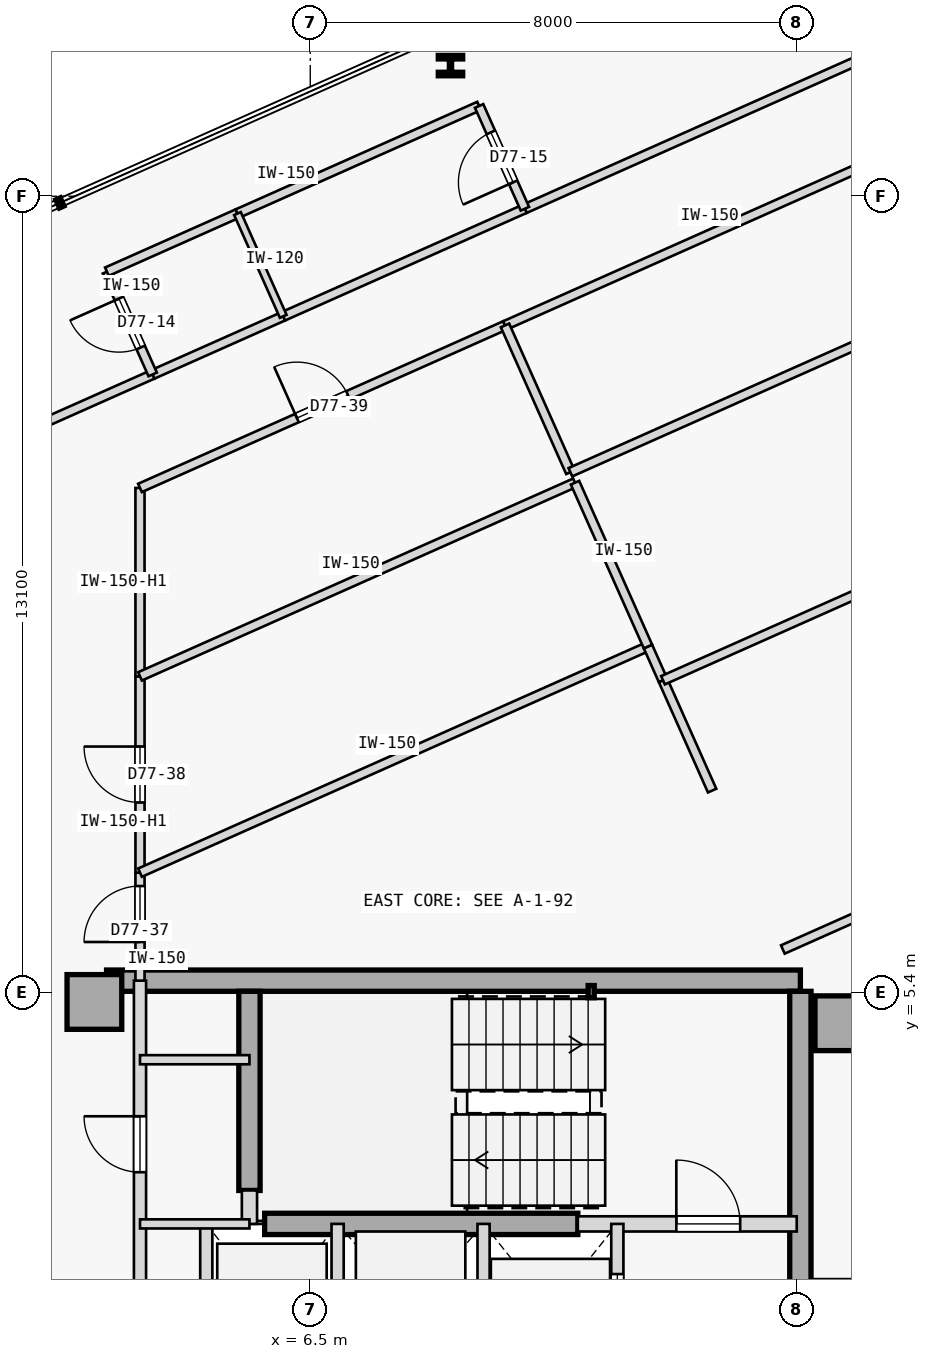
"""IFC4 building model, lengths in metres.
Left out: names, types, materials, properties, quantities, classifications, styles, units other than length and angle.
Written with IfcOpenShell. Run it as: python <this file> out.ifc"""

import sys

from ifc_helpers import new_model, si_unit, direction, frame, frame_2d, origin, origin_2d, place, context, subcontext, project, spatial, rectangle, hollow_rectangle, i_section, extrude, element, fill, save


model = new_model("IFC4")
c1 = context("Model", 3, precision=1e-05, world=origin(), true_north=direction((0.0, 1.0)))
c2 = subcontext(c1, "Body", "Model", "MODEL_VIEW")
j1 = project(units=[si_unit("LENGTHUNIT", "METRE"), si_unit("PLANEANGLEUNIT", "RADIAN")], contexts=[c1])
p1 = place(None, origin())
s1 = spatial("IfcSite", under=j1, at=p1, CompositionType="ELEMENT")
p2 = place(p1, origin())
s2 = spatial("IfcBuilding", under=s1, at=p2, CompositionType="ELEMENT")
p3 = place(p2, frame((0.0, 0.0, 288.6)))
s3 = spatial("IfcBuildingStorey", under=s2, at=p3, CompositionType="ELEMENT", Elevation=288.6)
for number, where, z_axis, x_axis in (
    (1, (15.25, 4.9, 0.0), (0.0, 0.0, 1.0), (1.0, 0.0, 0.0)),
    (2, (2.95, 5.25, 0.0), (0.0, 0.0, 1.0), (1.0, 0.0, 0.0)),
):
    element("IfcColumn", number, at=place(p3, frame(where, z_axis=z_axis, x_axis=x_axis)), inside=s3, PredefinedType="COLUMN", context=c2, shape_type="SweptSolid", body=[
        extrude(rectangle(XDim=0.9, YDim=0.9, at=origin_2d()), origin(), (0.0, 0.0, 1.0), 3.35),
    ])
p4 = place(p3, frame((3.15, 5.6, 0.0), z_axis=(0.0, 0.0, 1.0), x_axis=(1.0, 0.0, 0.0)))
e3 = element("IfcWall", 3, at=p4, inside=s3, PredefinedType="SHEAR", context=c2, shape_type="SweptSolid", body=[
    extrude(rectangle(XDim=11.41, YDim=0.35, at=frame_2d((5.705, 0.0))), origin(), (0.0, 0.0, 1.0), 3.125),
])
p5 = place(p3, frame((14.56, -5.425, 0.0), z_axis=(0.0, 0.0, 1.0), x_axis=(0.0, 1.0, 0.0)))
e4 = element("IfcWall", 4, at=p5, inside=s3, PredefinedType="SHEAR", context=c2, shape_type="SweptSolid", body=[
    extrude(rectangle(XDim=10.85, YDim=0.35, at=frame_2d((5.425, 0.0))), origin(), (0.0, 0.0, 1.0), 3.125),
])
p6 = place(p3, frame((5.5, 2.15, 0.0), z_axis=(0.0, 0.0, 1.0), x_axis=(0.0, 1.0, 0.0)))
e5 = element("IfcWall", 5, at=p6, inside=s3, PredefinedType="SHEAR", context=c2, shape_type="SweptSolid", body=[
    extrude(rectangle(XDim=3.275, YDim=0.35, at=frame_2d((1.638, 0.0))), origin(), (0.0, 0.0, 1.0), 3.125),
])
p7 = place(p3, frame((5.75, 1.6, 0.0), z_axis=(0.0, 0.0, 1.0), x_axis=(1.0, 0.0, 0.0)))
e6 = element("IfcWall", 6, at=p7, inside=s3, PredefinedType="SHEAR", context=c2, shape_type="SweptSolid", body=[
    extrude(rectangle(XDim=5.15, YDim=0.35, at=frame_2d((2.575, 0.0))), origin(), (0.0, 0.0, 1.0), 3.125),
])
p8 = place(p3, frame((11.12, 5.42, 0.0), z_axis=(0.0, 0.0, 1.0), x_axis=(1.0, 0.0, 0.0)))
e7 = element("IfcColumn", 7, at=p8, inside=s3, PredefinedType="COLUMN", context=c2, shape_type="SweptSolid", body=[
    extrude(hollow_rectangle(XDim=0.1, YDim=0.2, WallThickness=0.008, at=origin_2d()), origin(), (0.0, 0.0, 1.0), 3.35),
])
p9 = place(p3, frame((8.806, 20.648, 0.0), z_axis=(0.0, 0.0, 1.0), x_axis=(1.0, 0.0, 0.0)))
e8 = element("IfcColumn", 8, at=p9, inside=s3, PredefinedType="COLUMN", context=c2, shape_type="SweptSolid", body=[
    extrude(i_section(OverallWidth=0.401, OverallDepth=0.335, WebThickness=0.036, FlangeThickness=0.058, FilletRadius=0.015, at=origin_2d()), origin(), (0.0, 0.0, 1.0), 3.35),
])
p10 = place(p3, frame((10.9, 1.6, 0.0), z_axis=(0.0, 0.0, 1.0), x_axis=(1.0, 0.0, 0.0)))
e9 = element("IfcWall", 9, at=p10, inside=s3, PredefinedType="STANDARD", context=c2, shape_type="SweptSolid", body=[
    extrude(rectangle(XDim=3.6, YDim=0.25, at=frame_2d((1.8, 0.0))), origin(), (0.0, 0.0, 1.0), 3.125),
])
p11 = place(p10, frame((1.62, 0.0, 0.0)))
e10 = element("IfcOpeningElement", 10, at=p11, cuts=e9, PredefinedType="OPENING", context=c2, shape_type="SweptSolid", body=[
    extrude(rectangle(XDim=1.05, YDim=2.15, at=frame_2d((0.525, 1.075))), frame((0.0, 0.135, 0.0), z_axis=(0.0, -1.0, 0.0), x_axis=(1.0, 0.0, 0.0)), (0.0, 0.0, 1.0), 0.27),
])
p12 = place(p3, frame((5.5, 1.6, 0.0), z_axis=(0.0, 0.0, 1.0), x_axis=(0.0, 1.0, 0.0)))
e11 = element("IfcWall", 11, at=p12, inside=s3, PredefinedType="STANDARD", context=c2, shape_type="SweptSolid", body=[
    extrude(rectangle(XDim=0.55, YDim=0.25, at=frame_2d((0.275, 0.0))), origin(), (0.0, 0.0, 1.0), 3.125),
])
p13 = place(p3, frame((3.7, -1.15, 0.0), z_axis=(0.0, 0.0, 1.0), x_axis=(0.0, 1.0, 0.0)))
e12 = element("IfcWall", 12, at=p13, inside=s3, PredefinedType="STANDARD", context=c2, shape_type="SweptSolid", body=[
    extrude(rectangle(XDim=6.75, YDim=0.2, at=frame_2d((3.375, 0.0))), origin(), (0.0, 0.0, 1.0), 3.125),
])
p14 = place(p13, frame((3.6, 0.0, 0.0)))
e13 = element("IfcOpeningElement", 13, at=p14, cuts=e12, PredefinedType="OPENING", context=c2, shape_type="SweptSolid", body=[
    extrude(rectangle(XDim=0.92, YDim=2.15, at=frame_2d((0.46, 1.075))), frame((0.0, 0.11, 0.0), z_axis=(0.0, -1.0, 0.0), x_axis=(1.0, 0.0, 0.0)), (0.0, 0.0, 1.0), 0.22),
])
p15 = place(p13, frame((0.85, 0.0, 0.0)))
e14 = element("IfcOpeningElement", 14, at=p15, cuts=e12, PredefinedType="OPENING", context=c2, shape_type="SweptSolid", body=[
    extrude(rectangle(XDim=0.9, YDim=2.15, at=frame_2d((0.45, 1.075))), frame((0.0, 0.11, 0.0), z_axis=(0.0, -1.0, 0.0), x_axis=(1.0, 0.0, 0.0)), (0.0, 0.0, 1.0), 0.22),
])
p16 = place(p3, frame((11.55, -1.15, 0.0), z_axis=(0.0, 0.0, 1.0), x_axis=(0.0, 1.0, 0.0)))
e15 = element("IfcWall", 15, at=p16, inside=s3, PredefinedType="STANDARD", context=c2, shape_type="SweptSolid", body=[
    extrude(rectangle(XDim=2.75, YDim=0.2, at=frame_2d((1.375, 0.0))), origin(), (0.0, 0.0, 1.0), 3.125),
])
p17 = place(p16, frame((0.825, 0.0, 0.0)))
e16 = element("IfcOpeningElement", 16, at=p17, cuts=e15, PredefinedType="OPENING", context=c2, shape_type="SweptSolid", body=[
    extrude(rectangle(XDim=1.1, YDim=2.15, at=frame_2d((0.55, 1.075))), frame((0.0, 0.11, 0.0), z_axis=(0.0, -1.0, 0.0), x_axis=(1.0, 0.0, 0.0)), (0.0, 0.0, 1.0), 0.22),
])
for number, where, z_axis, x_axis in (
    (17, (9.35, -1.15, 0.0), (0.0, 0.0, 1.0), (0.0, 1.0, 0.0)),
    (18, (6.95, -1.15, 0.0), (0.0, 0.0, 1.0), (0.0, 1.0, 0.0)),
    (19, (4.79, -1.15, 0.0), (0.0, 0.0, 1.0), (0.0, 1.0, 0.0)),
):
    element("IfcWall", number, at=place(p3, frame(where, z_axis=z_axis, x_axis=x_axis)), inside=s3, PredefinedType="STANDARD", context=c2, shape_type="SweptSolid", body=[
        extrude(rectangle(XDim=2.75, YDim=0.2, at=frame_2d((1.375, 0.0))), origin(), (0.0, 0.0, 1.0), 3.125),
    ])
for number, where, z_axis, x_axis in (
    (20, (3.7, 4.3, 0.0), (0.0, 0.0, 1.0), (1.0, 0.0, 0.0)),
    (21, (3.7, 1.6, 0.0), (0.0, 0.0, 1.0), (1.0, 0.0, 0.0)),
):
    element("IfcWall", number, at=place(p3, frame(where, z_axis=z_axis, x_axis=x_axis)), inside=s3, PredefinedType="PARTITIONING", context=c2, shape_type="SweptSolid", body=[
        extrude(rectangle(XDim=1.8, YDim=0.15, at=frame_2d((0.9, 0.0))), origin(), (0.0, 0.0, 1.0), 3.125),
    ])
p18 = place(p3, frame((-1.166, 13.31, 0.0), z_axis=(0.0, 0.0, 1.0), x_axis=(0.913554005831, 0.406717442988, 0.0)))
e22 = element("IfcWall", 22, at=p18, inside=s3, PredefinedType="PARTITIONING", context=c2, shape_type="SweptSolid", body=[
    extrude(rectangle(XDim=5.555, YDim=0.15, at=frame_2d((2.777, 0.0))), origin(), (0.0, 0.0, 1.0), 3.125),
])
p19 = place(p3, frame((10.03, 18.294, 0.0), z_axis=(0.0, 0.0, 1.0), x_axis=(0.913545706015, 0.406736085222, 0.0)))
e23 = element("IfcWall", 23, at=p19, inside=s3, PredefinedType="PARTITIONING", context=c2, shape_type="SweptSolid", body=[
    extrude(rectangle(XDim=13.113, YDim=0.15, at=frame_2d((6.557, 0.0))), origin(), (0.0, 0.0, 1.0), 3.125),
])
p20 = place(p19, frame((6.082, 0.0, 0.0)))
e24 = element("IfcOpeningElement", 24, at=p20, cuts=e23, PredefinedType="OPENING", context=c2, shape_type="SweptSolid", body=[
    extrude(rectangle(XDim=0.95, YDim=2.15, at=frame_2d((0.475, 1.075))), frame((0.0, 0.085, 0.0), z_axis=(0.0, -1.0, 0.0), x_axis=(1.0, 0.0, 0.0)), (0.0, 0.0, 1.0), 0.17),
])
p21 = place(p3, frame((3.909, 15.569, 0.0), z_axis=(0.0, 0.0, 1.0), x_axis=(0.913541436194, 0.406745675276, 0.0)))
e25 = element("IfcWall", 25, at=p21, inside=s3, PredefinedType="PARTITIONING", context=c2, shape_type="SweptSolid", body=[
    extrude(rectangle(XDim=2.35, YDim=0.15, at=frame_2d((1.175, 0.0))), origin(), (0.0, 0.0, 1.0), 3.125),
])
p22 = place(p3, frame((6.055, 16.525, 0.0), z_axis=(0.0, 0.0, 1.0), x_axis=(0.913554477336, 0.406716383908, 0.0)))
e26 = element("IfcWall", 26, at=p22, inside=s3, PredefinedType="PARTITIONING", context=c2, shape_type="SweptSolid", body=[
    extrude(rectangle(XDim=4.35, YDim=0.15, at=frame_2d((2.175, 0.0))), origin(), (0.0, 0.0, 1.0), 3.125),
])
p23 = place(p3, frame((3.7, 5.601, 0.0), z_axis=(0.0, 0.0, 1.0), x_axis=(0.0, 1.0, 0.0)))
e27 = element("IfcWall", 27, at=p23, inside=s3, PredefinedType="PARTITIONING", context=c2, shape_type="SweptSolid", body=[
    extrude(rectangle(XDim=1.775, YDim=0.15, at=frame_2d((0.888, 0.0))), origin(), (0.0, 0.0, 1.0), 3.125),
])
p24 = place(p23, frame((0.635, 0.0, 0.0)))
e28 = element("IfcOpeningElement", 28, at=p24, cuts=e27, PredefinedType="OPENING", context=c2, shape_type="SweptSolid", body=[
    extrude(rectangle(XDim=0.92, YDim=2.15, at=frame_2d((0.46, 1.075))), frame((0.0, 0.085, 0.0), z_axis=(0.0, -1.0, 0.0), x_axis=(1.0, 0.0, 0.0)), (0.0, 0.0, 1.0), 0.17),
])
p25 = place(p3, frame((3.7, 7.376, 0.0), z_axis=(0.0, 0.0, 1.0), x_axis=(0.0, 1.0, 0.0)))
e29 = element("IfcWall", 29, at=p25, inside=s3, PredefinedType="PARTITIONING", context=c2, shape_type="SweptSolid", body=[
    extrude(rectangle(XDim=3.228, YDim=0.15, at=frame_2d((1.614, 0.0))), origin(), (0.0, 0.0, 1.0), 2.675),
])
p26 = place(p25, frame((1.154, 0.0, 0.0)))
e30 = element("IfcOpeningElement", 30, at=p26, cuts=e29, PredefinedType="OPENING", context=c2, shape_type="SweptSolid", body=[
    extrude(rectangle(XDim=0.92, YDim=2.15, at=frame_2d((0.46, 1.075))), frame((0.0, 0.085, 0.0), z_axis=(0.0, -1.0, 0.0), x_axis=(1.0, 0.0, 0.0)), (0.0, 0.0, 1.0), 0.17),
])
p27 = place(p3, frame((3.7, 10.604, 0.0), z_axis=(0.0, 0.0, 1.0), x_axis=(-0.000157567161, 0.999999987586, 0.0)))
e31 = element("IfcWall", 31, at=p27, inside=s3, PredefinedType="PARTITIONING", context=c2, shape_type="SweptSolid", body=[
    extrude(rectangle(XDim=3.099, YDim=0.15, at=frame_2d((1.549, 0.0))), origin(), (0.0, 0.0, 1.0), 2.675),
])
p28 = place(p3, frame((3.7, 13.703, 0.0), z_axis=(0.0, 0.0, 1.0), x_axis=(0.913549363376, 0.406727870542, 0.0)))
e32 = element("IfcWall", 32, at=p28, inside=s3, PredefinedType="PARTITIONING", context=c2, shape_type="SweptSolid", body=[
    extrude(rectangle(XDim=6.571, YDim=0.15, at=frame_2d((3.286, 0.0))), origin(), (0.0, 0.0, 1.0), 3.125),
])
p29 = place(p28, frame((2.825, 0.0, 0.0)))
e33 = element("IfcOpeningElement", 33, at=p29, cuts=e32, PredefinedType="OPENING", context=c2, shape_type="SweptSolid", body=[
    extrude(rectangle(XDim=0.92, YDim=2.15, at=frame_2d((0.46, 1.075))), frame((0.0, 0.085, 0.0), z_axis=(0.0, -1.0, 0.0), x_axis=(1.0, 0.0, 0.0)), (0.0, 0.0, 1.0), 0.17),
])
p30 = place(p3, frame((9.703, 16.375, 0.0), z_axis=(0.0, 0.0, 1.0), x_axis=(0.913544622417, 0.406738519018, 0.0)))
e34 = element("IfcWall", 34, at=p30, inside=s3, PredefinedType="PARTITIONING", context=c2, shape_type="SweptSolid", body=[
    extrude(rectangle(XDim=14.192, YDim=0.15, at=frame_2d((7.096, 0.0))), origin(), (0.0, 0.0, 1.0), 3.125),
])
p31 = place(p30, frame((6.636, 0.0, 0.0)))
e35 = element("IfcOpeningElement", 35, at=p31, cuts=e34, PredefinedType="OPENING", context=c2, shape_type="SweptSolid", body=[
    extrude(rectangle(XDim=0.92, YDim=2.15, at=frame_2d((0.46, 1.075))), frame((0.0, 0.085, 0.0), z_axis=(0.0, -1.0, 0.0), x_axis=(1.0, 0.0, 0.0)), (0.0, 0.0, 1.0), 0.17),
])
p32 = place(p3, frame((3.909, 15.569, 0.0), z_axis=(0.0, 0.0, 1.0), x_axis=(-0.406701600856, 0.913561058639, 0.0)))
e36 = element("IfcWall", 36, at=p32, inside=s3, PredefinedType="PARTITIONING", context=c2, shape_type="SweptSolid", body=[
    extrude(rectangle(XDim=1.85, YDim=0.15, at=frame_2d((0.925, 0.0))), origin(), (0.0, 0.0, 1.0), 3.125),
])
p33 = place(p32, frame((0.485, 0.0, 0.0)))
e37 = element("IfcOpeningElement", 37, at=p33, cuts=e36, PredefinedType="OPENING", context=c2, shape_type="SweptSolid", body=[
    extrude(rectangle(XDim=0.88, YDim=2.15, at=frame_2d((0.44, 1.075))), frame((0.0, 0.085, 0.0), z_axis=(0.0, -1.0, 0.0), x_axis=(1.0, 0.0, 0.0)), (0.0, 0.0, 1.0), 0.17),
])
p34 = place(p3, frame((3.156, 17.259, 0.0), z_axis=(0.0, 0.0, 1.0), x_axis=(0.913541436194, 0.406745675276, 0.0)))
e38 = element("IfcWall", 38, at=p34, inside=s3, PredefinedType="PARTITIONING", context=c2, shape_type="SweptSolid", body=[
    extrude(rectangle(XDim=2.35, YDim=0.15, at=frame_2d((1.175, 0.0))), origin(), (0.0, 0.0, 1.0), 3.125),
])
p35 = place(p3, frame((5.303, 18.215, 0.0), z_axis=(0.0, 0.0, 1.0), x_axis=(0.913554477336, 0.406716383908, 0.0)))
e39 = element("IfcWall", 39, at=p35, inside=s3, PredefinedType="PARTITIONING", context=c2, shape_type="SweptSolid", body=[
    extrude(rectangle(XDim=4.35, YDim=0.15, at=frame_2d((2.175, 0.0))), origin(), (0.0, 0.0, 1.0), 3.125),
])
p36 = place(p3, frame((10.03, 18.294, 0.0), z_axis=(0.0, 0.0, 1.0), x_axis=(-0.406701600856, 0.913561058639, 0.0)))
e40 = element("IfcWall", 40, at=p36, inside=s3, PredefinedType="PARTITIONING", context=c2, shape_type="SweptSolid", body=[
    extrude(rectangle(XDim=1.85, YDim=0.15, at=frame_2d((0.925, 0.0))), origin(), (0.0, 0.0, 1.0), 3.125),
])
p37 = place(p36, frame((0.475, 0.0, 0.0)))
e41 = element("IfcOpeningElement", 41, at=p37, cuts=e40, PredefinedType="OPENING", context=c2, shape_type="SweptSolid", body=[
    extrude(rectangle(XDim=0.9, YDim=2.15, at=frame_2d((0.45, 1.075))), frame((0.0, 0.085, 0.0), z_axis=(0.0, -1.0, 0.0), x_axis=(1.0, 0.0, 0.0)), (0.0, 0.0, 1.0), 0.17),
])
p38 = place(p3, frame((6.055, 16.525, 0.0), z_axis=(0.0, 0.0, 1.0), x_axis=(-0.406701600856, 0.913561058639, 0.0)))
e42 = element("IfcWall", 42, at=p38, inside=s3, PredefinedType="PARTITIONING", context=c2, shape_type="SweptSolid", body=[
    extrude(rectangle(XDim=1.85, YDim=0.12, at=frame_2d((0.925, 0.0))), origin(), (0.0, 0.0, 1.0), 3.125),
])
p39 = place(p3, frame((3.7, 7.376, 0.0), z_axis=(0.0, 0.0, 1.0), x_axis=(0.91354490899, 0.406737875367, 0.0)))
e43 = element("IfcWall", 43, at=p39, inside=s3, PredefinedType="PARTITIONING", context=c2, shape_type="SweptSolid", body=[
    extrude(rectangle(XDim=9.144, YDim=0.15, at=frame_2d((4.572, 0.0))), origin(), (0.0, 0.0, 1.0), 3.125),
])
p40 = place(p3, frame((13.109, 8.726, 0.0), z_axis=(0.0, 0.0, 1.0), x_axis=(-0.406788519224, 0.913522359128, 0.0)))
e44 = element("IfcWall", 44, at=p40, inside=s3, PredefinedType="PARTITIONING", context=c2, shape_type="SweptSolid", body=[
    extrude(rectangle(XDim=1.986, YDim=0.15, at=frame_2d((0.993, 0.0))), origin(), (0.0, 0.0, 1.0), 3.125),
])
p41 = place(p3, frame((12.301, 10.54, 0.0), z_axis=(0.0, 0.0, 1.0), x_axis=(-0.406436552015, 0.913679007741, 0.0)))
e45 = element("IfcWall", 45, at=p41, inside=s3, PredefinedType="PARTITIONING", context=c2, shape_type="SweptSolid", body=[
    extrude(rectangle(XDim=0.608, YDim=0.15, at=frame_2d((0.304, 0.0))), origin(), (0.0, 0.0, 1.0), 3.125),
])
p42 = place(p3, frame((3.7, 10.604, 0.0), z_axis=(0.0, 0.0, 1.0), x_axis=(0.913534926439, 0.406760295722, 0.0)))
e46 = element("IfcWall", 46, at=p42, inside=s3, PredefinedType="PARTITIONING", context=c2, shape_type="SweptSolid", body=[
    extrude(rectangle(XDim=7.831, YDim=0.15, at=frame_2d((3.916, 0.0))), origin(), (0.0, 0.0, 1.0), 3.125),
])
p43 = place(p3, frame((12.054, 11.095, 0.0), z_axis=(0.0, 0.0, 1.0), x_axis=(-0.406798922371, 0.91351772657, 0.0)))
e47 = element("IfcWall", 47, at=p43, inside=s3, PredefinedType="PARTITIONING", context=c2, shape_type="SweptSolid", body=[
    extrude(rectangle(XDim=2.949, YDim=0.15, at=frame_2d((1.475, 0.0))), origin(), (0.0, 0.0, 1.0), 3.125),
])
p44 = place(p3, frame((10.778, 13.961, 0.0), z_axis=(0.0, 0.0, 1.0), x_axis=(-0.406712614091, 0.913556155657, 0.0)))
e48 = element("IfcWall", 48, at=p44, inside=s3, PredefinedType="PARTITIONING", context=c2, shape_type="SweptSolid", body=[
    extrude(rectangle(XDim=2.643, YDim=0.15, at=frame_2d((1.322, 0.0))), origin(), (0.0, 0.0, 1.0), 3.125),
])
p45 = place(p3, frame((14.272, 6.113, 0.0), z_axis=(0.0, 0.0, 1.0), x_axis=(0.913551014388, 0.406724162191, 0.0)))
e49 = element("IfcWall", 49, at=p45, inside=s3, PredefinedType="PARTITIONING", context=c2, shape_type="SweptSolid", body=[
    extrude(rectangle(XDim=14.192, YDim=0.15, at=frame_2d((7.096, 0.0))), origin(), (0.0, 0.0, 1.0), 3.125),
])
p46 = place(p45, frame((6.636, 0.0, 0.0)))
e50 = element("IfcOpeningElement", 50, at=p46, cuts=e49, PredefinedType="OPENING", context=c2, shape_type="SweptSolid", body=[
    extrude(rectangle(XDim=0.92, YDim=2.15, at=frame_2d((0.46, 1.075))), frame((0.0, 0.085, 0.0), z_axis=(0.0, -1.0, 0.0), x_axis=(1.0, 0.0, 0.0)), (0.0, 0.0, 1.0), 0.17),
])
p47 = place(p3, frame((12.301, 10.54, 0.0), z_axis=(0.0, 0.0, 1.0), x_axis=(0.913544622417, 0.406738519018, 0.0)))
e51 = element("IfcWall", 51, at=p47, inside=s3, PredefinedType="PARTITIONING", context=c2, shape_type="SweptSolid", body=[
    extrude(rectangle(XDim=14.192, YDim=0.15, at=frame_2d((7.096, 0.0))), origin(), (0.0, 0.0, 1.0), 2.675),
])
p48 = place(p47, frame((6.636, 0.0, 0.0)))
e52 = element("IfcOpeningElement", 52, at=p48, cuts=e51, PredefinedType="OPENING", context=c2, shape_type="SweptSolid", body=[
    extrude(rectangle(XDim=0.92, YDim=2.15, at=frame_2d((0.46, 1.075))), frame((0.0, 0.085, 0.0), z_axis=(0.0, -1.0, 0.0), x_axis=(1.0, 0.0, 0.0)), (0.0, 0.0, 1.0), 0.17),
])
p49 = place(p3, frame((10.778, 13.961, 0.0), z_axis=(0.0, 0.0, 1.0), x_axis=(0.913544622417, 0.406738519018, 0.0)))
e53 = element("IfcWall", 53, at=p49, inside=s3, PredefinedType="PARTITIONING", context=c2, shape_type="SweptSolid", body=[
    extrude(rectangle(XDim=14.192, YDim=0.15, at=frame_2d((7.096, 0.0))), origin(), (0.0, 0.0, 1.0), 3.125),
])
p50 = place(p11, origin())
e54 = element("IfcDoor", 54, at=p50, inside=s3, OperationType="SINGLE_SWING_LEFT", PredefinedType="DOOR", context=c2, shape_type="SweptSolid", body=[
    extrude(rectangle(XDim=1.05, YDim=2.15, at=frame_2d((0.525, 1.075))), frame((0.0, 0.025, 0.0), z_axis=(0.0, -1.0, 0.0), x_axis=(1.0, 0.0, 0.0)), (0.0, 0.0, 1.0), 0.05),
])
fill(e10, e54)
p51 = place(p17, origin())
e55 = element("IfcDoor", 55, at=p51, inside=s3, OperationType="SLIDING_TO_RIGHT", PredefinedType="DOOR", context=c2, shape_type="SweptSolid", body=[
    extrude(rectangle(XDim=1.1, YDim=2.15, at=frame_2d((0.55, 1.075))), frame((0.0, 0.025, 0.0), z_axis=(0.0, -1.0, 0.0), x_axis=(1.0, 0.0, 0.0)), (0.0, 0.0, 1.0), 0.05),
])
fill(e16, e55)
p52 = place(p14, origin())
e56 = element("IfcDoor", 56, at=p52, inside=s3, OperationType="SINGLE_SWING_RIGHT", PredefinedType="DOOR", context=c2, shape_type="SweptSolid", body=[
    extrude(rectangle(XDim=0.92, YDim=2.15, at=frame_2d((0.46, 1.075))), frame((0.0, 0.025, 0.0), z_axis=(0.0, -1.0, 0.0), x_axis=(1.0, 0.0, 0.0)), (0.0, 0.0, 1.0), 0.05),
])
fill(e13, e56)
p53 = place(p33, origin())
e57 = element("IfcDoor", 57, at=p53, inside=s3, OperationType="SINGLE_SWING_RIGHT", PredefinedType="DOOR", context=c2, shape_type="SweptSolid", body=[
    extrude(rectangle(XDim=0.88, YDim=2.15, at=frame_2d((0.44, 1.075))), frame((0.0, 0.025, 0.0), z_axis=(0.0, -1.0, 0.0), x_axis=(1.0, 0.0, 0.0)), (0.0, 0.0, 1.0), 0.05),
])
fill(e37, e57)
p54 = place(p37, origin())
e58 = element("IfcDoor", 58, at=p54, inside=s3, OperationType="SINGLE_SWING_LEFT", PredefinedType="DOOR", context=c2, shape_type="SweptSolid", body=[
    extrude(rectangle(XDim=0.9, YDim=2.15, at=frame_2d((0.45, 1.075))), frame((0.0, 0.025, 0.0), z_axis=(0.0, -1.0, 0.0), x_axis=(1.0, 0.0, 0.0)), (0.0, 0.0, 1.0), 0.05),
])
fill(e41, e58)
p55 = place(p24, origin())
e59 = element("IfcDoor", 59, at=p55, inside=s3, OperationType="SINGLE_SWING_LEFT", PredefinedType="DOOR", context=c2, shape_type="SweptSolid", body=[
    extrude(rectangle(XDim=0.92, YDim=2.15, at=frame_2d((0.46, 1.075))), frame((0.0, 0.025, 0.0), z_axis=(0.0, -1.0, 0.0), x_axis=(1.0, 0.0, 0.0)), (0.0, 0.0, 1.0), 0.05),
])
fill(e28, e59)
p56 = place(p26, origin())
e60 = element("IfcDoor", 60, at=p56, inside=s3, OperationType="SINGLE_SWING_RIGHT", PredefinedType="DOOR", context=c2, shape_type="SweptSolid", body=[
    extrude(rectangle(XDim=0.92, YDim=2.15, at=frame_2d((0.46, 1.075))), frame((0.0, 0.025, 0.0), z_axis=(0.0, -1.0, 0.0), x_axis=(1.0, 0.0, 0.0)), (0.0, 0.0, 1.0), 0.05),
])
fill(e30, e60)
p57 = place(p29, origin())
e61 = element("IfcDoor", 61, at=p57, inside=s3, OperationType="SINGLE_SWING_LEFT", PredefinedType="DOOR", context=c2, shape_type="SweptSolid", body=[
    extrude(rectangle(XDim=0.92, YDim=2.15, at=frame_2d((0.46, 1.075))), frame((0.0, 0.025, 0.0), z_axis=(0.0, -1.0, 0.0), x_axis=(1.0, 0.0, 0.0)), (0.0, 0.0, 1.0), 0.05),
])
fill(e33, e61)
save(model, sys.argv[1])
